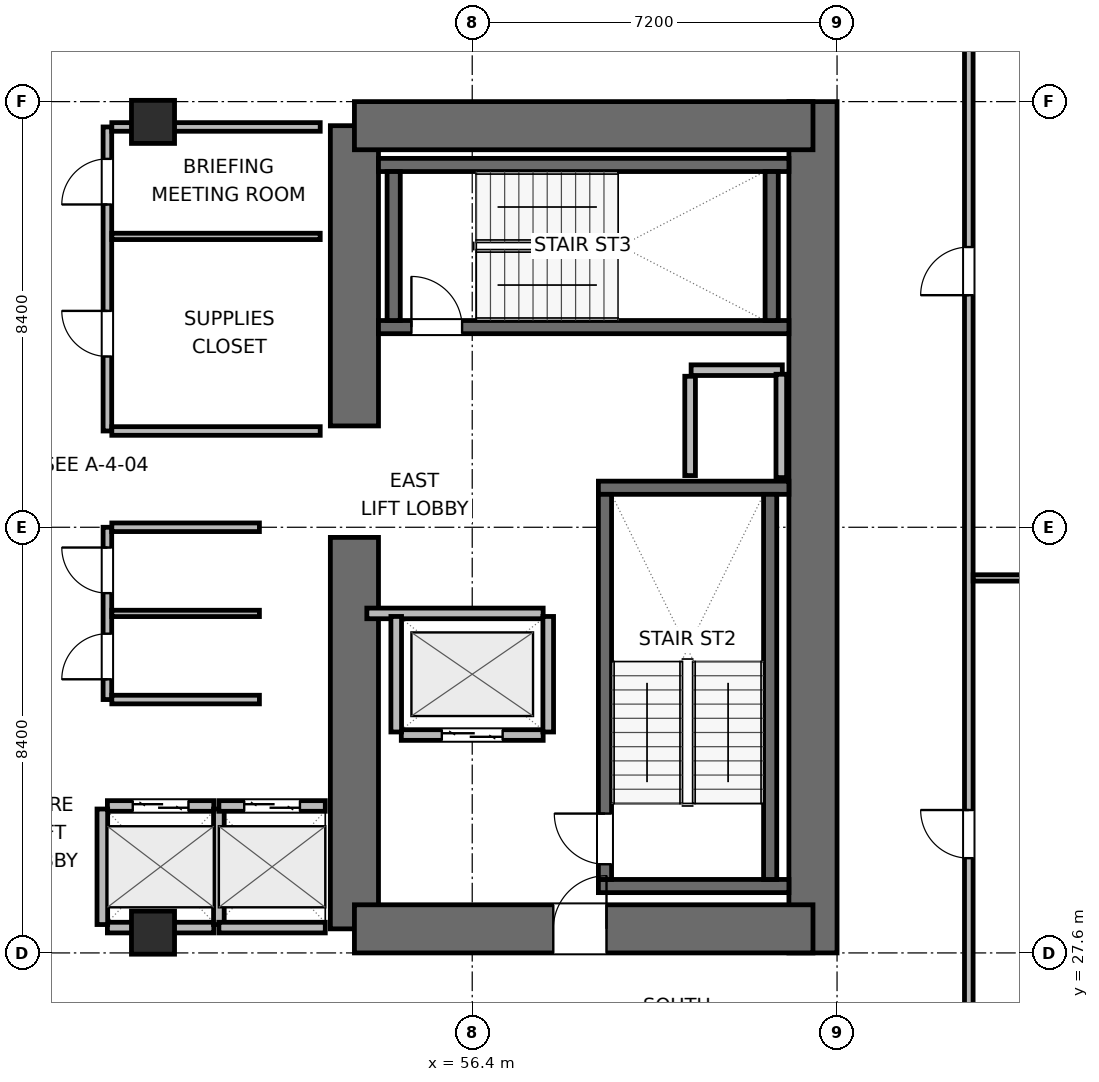
"""IFC4 building model, lengths in metres.
Left out: names, types, materials, properties, quantities, classifications, styles, units other than length and angle.
Written with IfcOpenShell. Run it as: python <this file> out.ifc"""

import sys

from ifc_helpers import new_model, si_unit, direction, frame, frame_2d, origin, origin_2d, place, context, subcontext, project, spatial, rectangle, extrude, element, fill, save


model = new_model("IFC4")
c1 = context("Model", 3, precision=1e-05, world=origin(), true_north=direction((0.0, 1.0)))
c2 = subcontext(c1, "Body", "Model", "MODEL_VIEW")
j1 = project(units=[si_unit("LENGTHUNIT", "METRE"), si_unit("PLANEANGLEUNIT", "RADIAN")], contexts=[c1])
p1 = place(None, origin())
s1 = spatial("IfcSite", under=j1, at=p1, CompositionType="ELEMENT")
p2 = place(p1, origin())
s2 = spatial("IfcBuilding", under=s1, at=p2, CompositionType="ELEMENT")
p3 = place(p2, frame((0.0, 0.0, 48.9)))
s3 = spatial("IfcBuildingStorey", under=s2, at=p3, CompositionType="ELEMENT", Elevation=48.9)
p4 = place(p3, frame((54.075, 28.075, 0.0), z_axis=(0.0, 0.0, 1.0), x_axis=(0.0, 1.0, 0.0)))
e1 = element("IfcWall", 1, at=p4, inside=s3, PredefinedType="SHEAR", context=c2, shape_type="SweptSolid", body=[
    extrude(rectangle(XDim=7.725, YDim=0.95, at=frame_2d((3.863, 0.0))), origin(), (0.0, 0.0, 1.0), 3.9),
])
p5 = place(p3, frame((54.075, 38.0, 0.0), z_axis=(0.0, 0.0, 1.0), x_axis=(0.0, 1.0, 0.0)))
e2 = element("IfcWall", 2, at=p5, inside=s3, PredefinedType="SHEAR", context=c2, shape_type="SweptSolid", body=[
    extrude(rectangle(XDim=5.925, YDim=0.95, at=frame_2d((2.962, 0.0))), origin(), (0.0, 0.0, 1.0), 3.9),
])
p6 = place(p3, frame((63.125, 27.6, 0.0), z_axis=(0.0, 0.0, 1.0), x_axis=(0.0, 1.0, 0.0)))
e3 = element("IfcWall", 3, at=p6, inside=s3, PredefinedType="SHEAR", context=c2, shape_type="SweptSolid", body=[
    extrude(rectangle(XDim=16.8, YDim=0.95, at=frame_2d((8.4, 0.0))), origin(), (0.0, 0.0, 1.0), 3.9),
])
p7 = place(p3, frame((54.075, 28.075, 0.0), z_axis=(0.0, 0.0, 1.0), x_axis=(1.0, 0.0, 0.0)))
e4 = element("IfcWall", 4, at=p7, inside=s3, PredefinedType="SHEAR", context=c2, shape_type="SweptSolid", body=[
    extrude(rectangle(XDim=9.05, YDim=0.95, at=frame_2d((4.525, 0.0))), origin(), (0.0, 0.0, 1.0), 3.9),
])
p8 = place(p7, frame((3.925, 0.0, 0.0)))
e5 = element("IfcOpeningElement", 5, at=p8, cuts=e4, PredefinedType="OPENING", context=c2, shape_type="SweptSolid", body=[
    extrude(rectangle(XDim=1.05, YDim=2.04, at=frame_2d((0.525, 1.02))), frame((0.0, 0.485, 0.0), z_axis=(0.0, -1.0, 0.0), x_axis=(1.0, 0.0, 0.0)), (0.0, 0.0, 1.0), 0.97),
])
p9 = place(p3, frame((54.075, 43.925, 0.0), z_axis=(0.0, 0.0, 1.0), x_axis=(1.0, 0.0, 0.0)))
e6 = element("IfcWall", 6, at=p9, inside=s3, PredefinedType="SHEAR", context=c2, shape_type="SweptSolid", body=[
    extrude(rectangle(XDim=9.05, YDim=0.95, at=frame_2d((4.525, 0.0))), origin(), (0.0, 0.0, 1.0), 3.9),
])
for number, where, z_axis, x_axis in (
    (7, (58.89, 28.92, 0.0), (0.0, 0.0, 1.0), (1.0, 0.0, 0.0)),
    (8, (58.89, 36.78, 0.0), (0.0, 0.0, 1.0), (1.0, 0.0, 0.0)),
):
    element("IfcWall", number, at=place(p3, frame(where, z_axis=z_axis, x_axis=x_axis)), inside=s3, PredefinedType="SHEAR", context=c2, shape_type="SweptSolid", body=[
        extrude(rectangle(XDim=3.76, YDim=0.26, at=frame_2d((1.88, 0.0))), origin(), (0.0, 0.0, 1.0), 3.9),
    ])
p10 = place(p3, frame((59.02, 29.05, 0.0), z_axis=(0.0, 0.0, 1.0), x_axis=(0.0, 1.0, 0.0)))
e9 = element("IfcWall", 9, at=p10, inside=s3, PredefinedType="SHEAR", context=c2, shape_type="SweptSolid", body=[
    extrude(rectangle(XDim=7.6, YDim=0.26, at=frame_2d((3.8, 0.0))), origin(), (0.0, 0.0, 1.0), 3.9),
])
p11 = place(p10, frame((0.3, 0.0, 0.0)))
e10 = element("IfcOpeningElement", 10, at=p11, cuts=e9, PredefinedType="OPENING", context=c2, shape_type="SweptSolid", body=[
    extrude(rectangle(XDim=1.0, YDim=2.04, at=frame_2d((0.5, 1.02))), frame((0.0, 0.14, 0.0), z_axis=(0.0, -1.0, 0.0), x_axis=(1.0, 0.0, 0.0)), (0.0, 0.0, 1.0), 0.28),
])
p12 = place(p3, frame((62.28, 29.05, 0.0), z_axis=(0.0, 0.0, 1.0), x_axis=(0.0, 1.0, 0.0)))
e11 = element("IfcWall", 11, at=p12, inside=s3, PredefinedType="SHEAR", context=c2, shape_type="SweptSolid", body=[
    extrude(rectangle(XDim=7.6, YDim=0.26, at=frame_2d((3.8, 0.0))), origin(), (0.0, 0.0, 1.0), 3.9),
])
p13 = place(p3, frame((54.55, 39.95, 0.0), z_axis=(0.0, 0.0, 1.0), x_axis=(1.0, 0.0, 0.0)))
e12 = element("IfcWall", 12, at=p13, inside=s3, PredefinedType="SHEAR", context=c2, shape_type="SweptSolid", body=[
    extrude(rectangle(XDim=8.1, YDim=0.26, at=frame_2d((4.05, 0.0))), origin(), (0.0, 0.0, 1.0), 3.9),
])
p14 = place(p13, frame((0.65, 0.0, 0.0)))
e13 = element("IfcOpeningElement", 13, at=p14, cuts=e12, PredefinedType="OPENING", context=c2, shape_type="SweptSolid", body=[
    extrude(rectangle(XDim=1.0, YDim=2.04, at=frame_2d((0.5, 1.02))), frame((0.0, 0.14, 0.0), z_axis=(0.0, -1.0, 0.0), x_axis=(1.0, 0.0, 0.0)), (0.0, 0.0, 1.0), 0.28),
])
p15 = place(p3, frame((54.55, 43.15, 0.0), z_axis=(0.0, 0.0, 1.0), x_axis=(1.0, 0.0, 0.0)))
e14 = element("IfcWall", 14, at=p15, inside=s3, PredefinedType="SHEAR", context=c2, shape_type="SweptSolid", body=[
    extrude(rectangle(XDim=8.1, YDim=0.26, at=frame_2d((4.05, 0.0))), origin(), (0.0, 0.0, 1.0), 3.9),
])
for number, where, z_axis, x_axis in (
    (15, (54.85, 40.08, 0.0), (0.0, 0.0, 1.0), (0.0, 1.0, 0.0)),
    (16, (62.31, 40.08, 0.0), (0.0, 0.0, 1.0), (0.0, 1.0, 0.0)),
):
    element("IfcWall", number, at=place(p3, frame(where, z_axis=z_axis, x_axis=x_axis)), inside=s3, PredefinedType="SHEAR", context=c2, shape_type="SweptSolid", body=[
        extrude(rectangle(XDim=2.94, YDim=0.26, at=frame_2d((1.47, 0.0))), origin(), (0.0, 0.0, 1.0), 3.9),
    ])
for number, where, z_axis, x_axis in (
    (17, (50.1, 28.0, 0.0), (0.0, 0.0, 1.0), (1.0, 0.0, 0.0)),
    (18, (50.1, 44.0, 0.0), (0.0, 0.0, 1.0), (1.0, 0.0, 0.0)),
):
    element("IfcColumn", number, at=place(p3, frame(where, z_axis=z_axis, x_axis=x_axis)), inside=s3, PredefinedType="COLUMN", context=c2, shape_type="SweptSolid", body=[
        extrude(rectangle(XDim=0.85, YDim=0.85, at=origin_2d()), origin(), (0.0, 0.0, 1.0), 3.9),
    ])
p16 = place(p3, frame((60.72, 39.1, 0.0), z_axis=(0.0, 0.0, 1.0), x_axis=(1.0, 0.0, 0.0)))
e19 = element("IfcWall", 19, at=p16, inside=s3, PredefinedType="PARTITIONING", context=c2, shape_type="SweptSolid", body=[
    extrude(rectangle(XDim=1.8, YDim=0.21, at=frame_2d((0.9, 0.0))), origin(), (0.0, 0.0, 1.0), 3.64),
])
p17 = place(p3, frame((60.7, 37.02, 0.0), z_axis=(0.0, 0.0, 1.0), x_axis=(0.0, 1.0, 0.0)))
e20 = element("IfcWall", 20, at=p17, inside=s3, PredefinedType="PARTITIONING", context=c2, shape_type="SweptSolid", body=[
    extrude(rectangle(XDim=1.96, YDim=0.21, at=frame_2d((0.98, 0.0))), origin(), (0.0, 0.0, 1.0), 3.64),
])
p18 = place(p3, frame((62.5, 36.98, 0.0), z_axis=(0.0, 0.0, 1.0), x_axis=(0.0, 1.0, 0.0)))
e21 = element("IfcWall", 21, at=p18, inside=s3, PredefinedType="PARTITIONING", context=c2, shape_type="SweptSolid", body=[
    extrude(rectangle(XDim=2.04, YDim=0.21, at=frame_2d((1.02, 0.0))), origin(), (0.0, 0.0, 1.0), 3.64),
])
p19 = place(p3, frame((55.0, 31.9, 0.0), z_axis=(0.0, 0.0, 1.0), x_axis=(1.0, 0.0, 0.0)))
e22 = element("IfcWall", 22, at=p19, inside=s3, PredefinedType="PARTITIONING", context=c2, shape_type="SweptSolid", body=[
    extrude(rectangle(XDim=2.8, YDim=0.21, at=frame_2d((1.4, 0.0))), origin(), (0.0, 0.0, 1.0), 3.64),
])
p20 = place(p19, frame((0.8, 0.0, 0.0)))
e23 = element("IfcOpeningElement", 23, at=p20, cuts=e22, PredefinedType="OPENING", context=c2, shape_type="SweptSolid", body=[
    extrude(rectangle(XDim=1.2, YDim=2.04, at=frame_2d((0.6, 1.02))), frame((0.0, 0.115, 0.0), z_axis=(0.0, -1.0, 0.0), x_axis=(1.0, 0.0, 0.0)), (0.0, 0.0, 1.0), 0.23),
])
p21 = place(p3, frame((54.32, 34.3, 0.0), z_axis=(0.0, 0.0, 1.0), x_axis=(1.0, 0.0, 0.0)))
e24 = element("IfcWall", 24, at=p21, inside=s3, PredefinedType="PARTITIONING", context=c2, shape_type="SweptSolid", body=[
    extrude(rectangle(XDim=3.48, YDim=0.21, at=frame_2d((1.74, 0.0))), origin(), (0.0, 0.0, 1.0), 3.64),
])
for number, where, z_axis, x_axis in (
    (25, (54.9, 31.96, 0.0), (0.0, 0.0, 1.0), (0.0, 1.0, 0.0)),
    (26, (57.9, 31.96, 0.0), (0.0, 0.0, 1.0), (0.0, 1.0, 0.0)),
):
    element("IfcWall", number, at=place(p3, frame(where, z_axis=z_axis, x_axis=x_axis)), inside=s3, PredefinedType="PARTITIONING", context=c2, shape_type="SweptSolid", body=[
        extrude(rectangle(XDim=2.28, YDim=0.21, at=frame_2d((1.14, 0.0))), origin(), (0.0, 0.0, 1.0), 3.64),
    ])
p22 = place(p3, frame((49.2, 30.5, 0.0), z_axis=(0.0, 0.0, 1.0), x_axis=(1.0, 0.0, 0.0)))
e27 = element("IfcWall", 27, at=p22, inside=s3, PredefinedType="PARTITIONING", context=c2, shape_type="SweptSolid", body=[
    extrude(rectangle(XDim=2.1, YDim=0.21, at=frame_2d((1.05, 0.0))), origin(), (0.0, 0.0, 1.0), 3.64),
])
p23 = place(p22, frame((0.5, 0.0, 0.0)))
e28 = element("IfcOpeningElement", 28, at=p23, cuts=e27, PredefinedType="OPENING", context=c2, shape_type="SweptSolid", body=[
    extrude(rectangle(XDim=1.1, YDim=2.04, at=frame_2d((0.55, 1.02))), frame((0.0, 0.115, 0.0), z_axis=(0.0, -1.0, 0.0), x_axis=(1.0, 0.0, 0.0)), (0.0, 0.0, 1.0), 0.23),
])
p24 = place(p3, frame((49.2, 28.1, 0.0), z_axis=(0.0, 0.0, 1.0), x_axis=(1.0, 0.0, 0.0)))
e29 = element("IfcWall", 29, at=p24, inside=s3, PredefinedType="PARTITIONING", context=c2, shape_type="SweptSolid", body=[
    extrude(rectangle(XDim=2.1, YDim=0.21, at=frame_2d((1.05, 0.0))), origin(), (0.0, 0.0, 1.0), 2.525),
])
for number, where, z_axis, x_axis in (
    (30, (49.1, 28.16, 0.0), (0.0, 0.0, 1.0), (0.0, 1.0, 0.0)),
    (31, (51.4, 28.16, 0.0), (0.0, 0.0, 1.0), (0.0, 1.0, 0.0)),
):
    element("IfcWall", number, at=place(p3, frame(where, z_axis=z_axis, x_axis=x_axis)), inside=s3, PredefinedType="PARTITIONING", context=c2, shape_type="SweptSolid", body=[
        extrude(rectangle(XDim=2.28, YDim=0.21, at=frame_2d((1.14, 0.0))), origin(), (0.0, 0.0, 1.0), 3.64),
    ])
p25 = place(p3, frame((51.4, 30.5, 0.0), z_axis=(0.0, 0.0, 1.0), x_axis=(1.0, 0.0, 0.0)))
e32 = element("IfcWall", 32, at=p25, inside=s3, PredefinedType="PARTITIONING", context=c2, shape_type="SweptSolid", body=[
    extrude(rectangle(XDim=2.1, YDim=0.21, at=frame_2d((1.05, 0.0))), origin(), (0.0, 0.0, 1.0), 3.64),
])
p26 = place(p25, frame((0.5, 0.0, 0.0)))
e33 = element("IfcOpeningElement", 33, at=p26, cuts=e32, PredefinedType="OPENING", context=c2, shape_type="SweptSolid", body=[
    extrude(rectangle(XDim=1.1, YDim=2.04, at=frame_2d((0.55, 1.02))), frame((0.0, 0.115, 0.0), z_axis=(0.0, -1.0, 0.0), x_axis=(1.0, 0.0, 0.0)), (0.0, 0.0, 1.0), 0.23),
])
p27 = place(p3, frame((51.4, 28.1, 0.0), z_axis=(0.0, 0.0, 1.0), x_axis=(1.0, 0.0, 0.0)))
e34 = element("IfcWall", 34, at=p27, inside=s3, PredefinedType="PARTITIONING", context=c2, shape_type="SweptSolid", body=[
    extrude(rectangle(XDim=2.1, YDim=0.21, at=frame_2d((1.05, 0.0))), origin(), (0.0, 0.0, 1.0), 2.525),
])
p28 = place(p3, frame((49.2, 32.6, 0.0), z_axis=(0.0, 0.0, 1.0), x_axis=(0.0, 1.0, 0.0)))
e35 = element("IfcWall", 35, at=p28, inside=s3, PredefinedType="PARTITIONING", context=c2, shape_type="SweptSolid", body=[
    extrude(rectangle(XDim=3.4, YDim=0.17, at=frame_2d((1.7, 0.0))), origin(), (0.0, 0.0, 1.0), 3.64),
])
p29 = place(p28, frame((0.4, 0.0, 0.0)))
e36 = element("IfcOpeningElement", 36, at=p29, cuts=e35, PredefinedType="OPENING", context=c2, shape_type="SweptSolid", body=[
    extrude(rectangle(XDim=0.9, YDim=2.02, at=frame_2d((0.45, 1.01))), frame((0.0, 0.095, 0.0), z_axis=(0.0, -1.0, 0.0), x_axis=(1.0, 0.0, 0.0)), (0.0, 0.0, 1.0), 0.19),
])
p30 = place(p28, frame((2.1, 0.0, 0.0)))
e37 = element("IfcOpeningElement", 37, at=p30, cuts=e35, PredefinedType="OPENING", context=c2, shape_type="SweptSolid", body=[
    extrude(rectangle(XDim=0.9, YDim=2.02, at=frame_2d((0.45, 1.01))), frame((0.0, 0.095, 0.0), z_axis=(0.0, -1.0, 0.0), x_axis=(1.0, 0.0, 0.0)), (0.0, 0.0, 1.0), 0.19),
])
for number, where, z_axis, x_axis in (
    (38, (49.287, 32.6, 0.0), (0.0, 0.0, 1.0), (1.0, 0.0, 0.0)),
    (39, (49.287, 36.0, 0.0), (0.0, 0.0, 1.0), (1.0, 0.0, 0.0)),
):
    element("IfcWall", number, at=place(p3, frame(where, z_axis=z_axis, x_axis=x_axis)), inside=s3, PredefinedType="PARTITIONING", context=c2, shape_type="SweptSolid", body=[
        extrude(rectangle(XDim=2.913, YDim=0.17, at=frame_2d((1.457, 0.0))), origin(), (0.0, 0.0, 1.0), 3.64),
    ])
p31 = place(p3, frame((49.287, 34.3, 0.0), z_axis=(0.0, 0.0, 1.0), x_axis=(1.0, 0.0, 0.0)))
e40 = element("IfcWall", 40, at=p31, inside=s3, PredefinedType="PARTITIONING", context=c2, shape_type="SweptSolid", body=[
    extrude(rectangle(XDim=2.913, YDim=0.125, at=frame_2d((1.457, 0.0))), origin(), (0.0, 0.0, 1.0), 3.64),
])
p32 = place(p3, frame((49.2, 37.9, 0.0), z_axis=(0.0, 0.0, 1.0), x_axis=(0.0, 1.0, 0.0)))
e41 = element("IfcWall", 41, at=p32, inside=s3, PredefinedType="PARTITIONING", context=c2, shape_type="SweptSolid", body=[
    extrude(rectangle(XDim=6.0, YDim=0.17, at=frame_2d((3.0, 0.0))), origin(), (0.0, 0.0, 1.0), 3.64),
])
p33 = place(p32, frame((1.47, 0.0, 0.0)))
e42 = element("IfcOpeningElement", 42, at=p33, cuts=e41, PredefinedType="OPENING", context=c2, shape_type="SweptSolid", body=[
    extrude(rectangle(XDim=0.9, YDim=2.02, at=frame_2d((0.45, 1.01))), frame((0.0, 0.095, 0.0), z_axis=(0.0, -1.0, 0.0), x_axis=(1.0, 0.0, 0.0)), (0.0, 0.0, 1.0), 0.19),
])
p34 = place(p32, frame((4.47, 0.0, 0.0)))
e43 = element("IfcOpeningElement", 43, at=p34, cuts=e41, PredefinedType="OPENING", context=c2, shape_type="SweptSolid", body=[
    extrude(rectangle(XDim=0.9, YDim=2.02, at=frame_2d((0.45, 1.01))), frame((0.0, 0.095, 0.0), z_axis=(0.0, -1.0, 0.0), x_axis=(1.0, 0.0, 0.0)), (0.0, 0.0, 1.0), 0.19),
])
p35 = place(p3, frame((49.287, 37.9, 0.0), z_axis=(0.0, 0.0, 1.0), x_axis=(1.0, 0.0, 0.0)))
e44 = element("IfcWall", 44, at=p35, inside=s3, PredefinedType="PARTITIONING", context=c2, shape_type="SweptSolid", body=[
    extrude(rectangle(XDim=4.113, YDim=0.17, at=frame_2d((2.056, 0.0))), origin(), (0.0, 0.0, 1.0), 3.64),
])
p36 = place(p3, frame((49.287, 43.9, 0.0), z_axis=(0.0, 0.0, 1.0), x_axis=(1.0, 0.0, 0.0)))
e45 = element("IfcWall", 45, at=p36, inside=s3, PredefinedType="PARTITIONING", context=c2, shape_type="SweptSolid", body=[
    extrude(rectangle(XDim=4.113, YDim=0.17, at=frame_2d((2.056, 0.0))), origin(), (0.0, 0.0, 1.0), 2.525),
])
p37 = place(p3, frame((49.287, 41.74, 0.0), z_axis=(0.0, 0.0, 1.0), x_axis=(1.0, 0.0, 0.0)))
e46 = element("IfcWall", 46, at=p37, inside=s3, PredefinedType="PARTITIONING", context=c2, shape_type="SweptSolid", body=[
    extrude(rectangle(XDim=4.113, YDim=0.125, at=frame_2d((2.056, 0.0))), origin(), (0.0, 0.0, 1.0), 3.64),
])
p38 = place(p3, frame((66.2, 24.977, 0.0), z_axis=(0.0, 0.0, 1.0), x_axis=(0.0, 1.0, 0.0)))
e47 = element("IfcWall", 47, at=p38, inside=s3, PredefinedType="PARTITIONING", context=c2, shape_type="SweptSolid", body=[
    extrude(rectangle(XDim=22.046, YDim=0.17, at=frame_2d((11.023, 0.0))), origin(), (0.0, 0.0, 1.0), 3.64),
])
p39 = place(p38, frame((4.493, 0.0, 0.0)))
e48 = element("IfcOpeningElement", 48, at=p39, cuts=e47, PredefinedType="OPENING", context=c2, shape_type="SweptSolid", body=[
    extrude(rectangle(XDim=0.95, YDim=2.04, at=frame_2d((0.475, 1.02))), frame((0.0, 0.095, 0.0), z_axis=(0.0, -1.0, 0.0), x_axis=(1.0, 0.0, 0.0)), (0.0, 0.0, 1.0), 0.19),
])
p40 = place(p38, frame((15.603, 0.0, 0.0)))
e49 = element("IfcOpeningElement", 49, at=p40, cuts=e47, PredefinedType="OPENING", context=c2, shape_type="SweptSolid", body=[
    extrude(rectangle(XDim=0.95, YDim=2.04, at=frame_2d((0.475, 1.02))), frame((0.0, 0.095, 0.0), z_axis=(0.0, -1.0, 0.0), x_axis=(1.0, 0.0, 0.0)), (0.0, 0.0, 1.0), 0.19),
])
p41 = place(p3, frame((66.287, 35.0, 0.0), z_axis=(0.0, 0.0, 1.0), x_axis=(1.0, 0.0, 0.0)))
e50 = element("IfcWall", 50, at=p41, inside=s3, PredefinedType="PARTITIONING", context=c2, shape_type="SweptSolid", body=[
    extrude(rectangle(XDim=12.668, YDim=0.125, at=frame_2d((6.334, 0.0))), origin(), (0.0, 0.0, 1.0), 3.64),
])
p42 = place(p11, origin())
e51 = element("IfcDoor", 51, at=p42, inside=s3, OperationType="SINGLE_SWING_RIGHT", PredefinedType="DOOR", context=c2, shape_type="SweptSolid", body=[
    extrude(rectangle(XDim=1.0, YDim=2.04, at=frame_2d((0.5, 1.02))), frame((0.0, 0.025, 0.0), z_axis=(0.0, -1.0, 0.0), x_axis=(1.0, 0.0, 0.0)), (0.0, 0.0, 1.0), 0.05),
])
fill(e10, e51)
p43 = place(p14, origin())
e52 = element("IfcDoor", 52, at=p43, inside=s3, OperationType="SINGLE_SWING_LEFT", PredefinedType="DOOR", context=c2, shape_type="SweptSolid", body=[
    extrude(rectangle(XDim=1.0, YDim=2.04, at=frame_2d((0.5, 1.02))), frame((0.0, 0.025, 0.0), z_axis=(0.0, -1.0, 0.0), x_axis=(1.0, 0.0, 0.0)), (0.0, 0.0, 1.0), 0.05),
])
fill(e13, e52)
p44 = place(p20, origin())
e53 = element("IfcDoor", 53, at=p44, inside=s3, OperationType="DOUBLE_DOOR_SLIDING", PredefinedType="DOOR", context=c2, shape_type="SweptSolid", body=[
    extrude(rectangle(XDim=1.2, YDim=2.04, at=frame_2d((0.6, 1.02))), frame((0.0, 0.025, 0.0), z_axis=(0.0, -1.0, 0.0), x_axis=(1.0, 0.0, 0.0)), (0.0, 0.0, 1.0), 0.05),
])
fill(e23, e53)
p45 = place(p23, origin())
e54 = element("IfcDoor", 54, at=p45, inside=s3, OperationType="DOUBLE_DOOR_SLIDING", PredefinedType="DOOR", context=c2, shape_type="SweptSolid", body=[
    extrude(rectangle(XDim=1.1, YDim=2.04, at=frame_2d((0.55, 1.02))), frame((0.0, 0.025, 0.0), z_axis=(0.0, -1.0, 0.0), x_axis=(1.0, 0.0, 0.0)), (0.0, 0.0, 1.0), 0.05),
])
fill(e28, e54)
p46 = place(p26, origin())
e55 = element("IfcDoor", 55, at=p46, inside=s3, OperationType="DOUBLE_DOOR_SLIDING", PredefinedType="DOOR", context=c2, shape_type="SweptSolid", body=[
    extrude(rectangle(XDim=1.1, YDim=2.04, at=frame_2d((0.55, 1.02))), frame((0.0, 0.025, 0.0), z_axis=(0.0, -1.0, 0.0), x_axis=(1.0, 0.0, 0.0)), (0.0, 0.0, 1.0), 0.05),
])
fill(e33, e55)
p47 = place(p8, origin())
e56 = element("IfcDoor", 56, at=p47, inside=s3, OperationType="SINGLE_SWING_RIGHT", PredefinedType="DOOR", context=c2, shape_type="SweptSolid", body=[
    extrude(rectangle(XDim=1.05, YDim=2.04, at=frame_2d((0.525, 1.02))), frame((0.0, 0.025, 0.0), z_axis=(0.0, -1.0, 0.0), x_axis=(1.0, 0.0, 0.0)), (0.0, 0.0, 1.0), 0.05),
])
fill(e5, e56)
p48 = place(p29, origin())
e57 = element("IfcDoor", 57, at=p48, inside=s3, OperationType="SINGLE_SWING_LEFT", PredefinedType="DOOR", context=c2, shape_type="SweptSolid", body=[
    extrude(rectangle(XDim=0.9, YDim=2.02, at=frame_2d((0.45, 1.01))), frame((0.0, 0.025, 0.0), z_axis=(0.0, -1.0, 0.0), x_axis=(1.0, 0.0, 0.0)), (0.0, 0.0, 1.0), 0.05),
])
fill(e36, e57)
p49 = place(p30, origin())
e58 = element("IfcDoor", 58, at=p49, inside=s3, OperationType="SINGLE_SWING_RIGHT", PredefinedType="DOOR", context=c2, shape_type="SweptSolid", body=[
    extrude(rectangle(XDim=0.9, YDim=2.02, at=frame_2d((0.45, 1.01))), frame((0.0, 0.025, 0.0), z_axis=(0.0, -1.0, 0.0), x_axis=(1.0, 0.0, 0.0)), (0.0, 0.0, 1.0), 0.05),
])
fill(e37, e58)
p50 = place(p33, origin())
e59 = element("IfcDoor", 59, at=p50, inside=s3, OperationType="SINGLE_SWING_RIGHT", PredefinedType="DOOR", context=c2, shape_type="SweptSolid", body=[
    extrude(rectangle(XDim=0.9, YDim=2.02, at=frame_2d((0.45, 1.01))), frame((0.0, 0.025, 0.0), z_axis=(0.0, -1.0, 0.0), x_axis=(1.0, 0.0, 0.0)), (0.0, 0.0, 1.0), 0.05),
])
fill(e42, e59)
p51 = place(p34, origin())
e60 = element("IfcDoor", 60, at=p51, inside=s3, OperationType="SINGLE_SWING_LEFT", PredefinedType="DOOR", context=c2, shape_type="SweptSolid", body=[
    extrude(rectangle(XDim=0.9, YDim=2.02, at=frame_2d((0.45, 1.01))), frame((0.0, 0.025, 0.0), z_axis=(0.0, -1.0, 0.0), x_axis=(1.0, 0.0, 0.0)), (0.0, 0.0, 1.0), 0.05),
])
fill(e43, e60)
p52 = place(p39, origin())
e61 = element("IfcDoor", 61, at=p52, inside=s3, OperationType="SINGLE_SWING_RIGHT", PredefinedType="DOOR", context=c2, shape_type="SweptSolid", body=[
    extrude(rectangle(XDim=0.95, YDim=2.04, at=frame_2d((0.475, 1.02))), frame((0.0, 0.025, 0.0), z_axis=(0.0, -1.0, 0.0), x_axis=(1.0, 0.0, 0.0)), (0.0, 0.0, 1.0), 0.05),
])
fill(e48, e61)
p53 = place(p40, origin())
e62 = element("IfcDoor", 62, at=p53, inside=s3, OperationType="SINGLE_SWING_LEFT", PredefinedType="DOOR", context=c2, shape_type="SweptSolid", body=[
    extrude(rectangle(XDim=0.95, YDim=2.04, at=frame_2d((0.475, 1.02))), frame((0.0, 0.025, 0.0), z_axis=(0.0, -1.0, 0.0), x_axis=(1.0, 0.0, 0.0)), (0.0, 0.0, 1.0), 0.05),
])
fill(e49, e62)
save(model, sys.argv[1])
